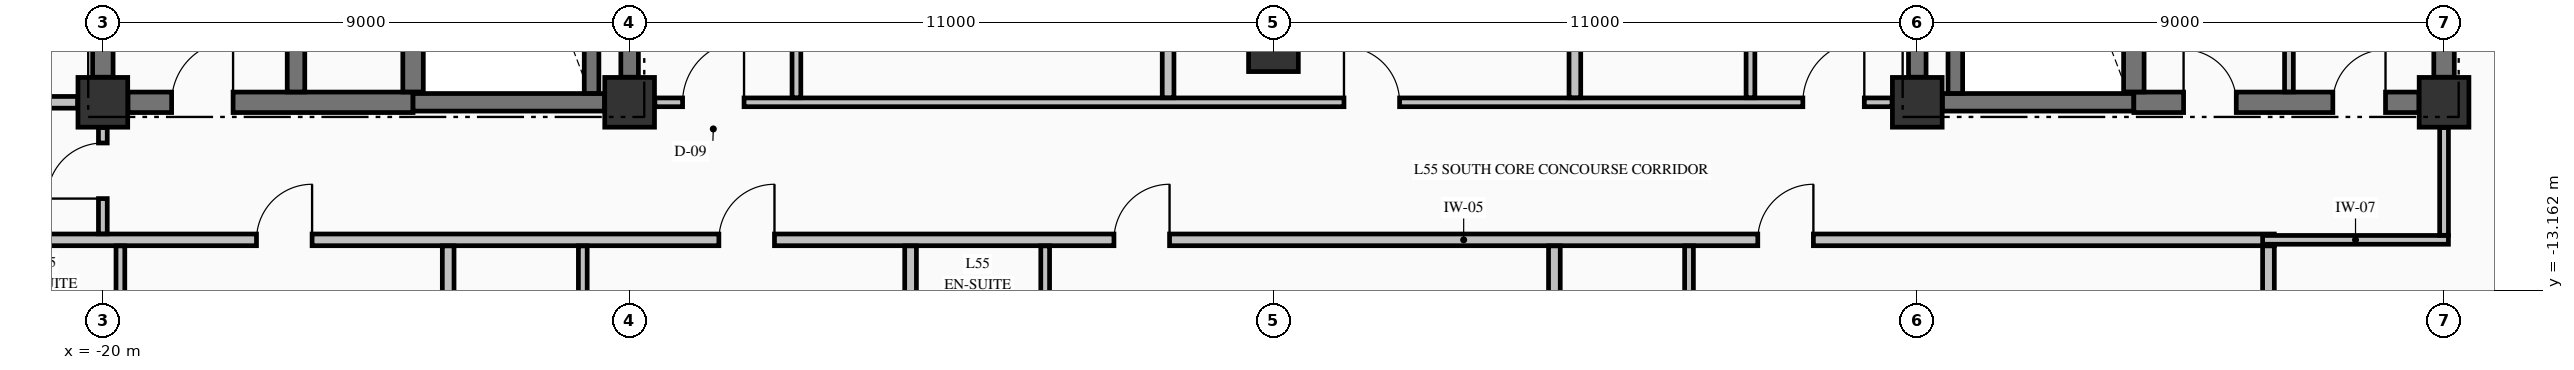
"""IFC4 building model, lengths in metres.
Left out: names, types, materials, properties, quantities, classifications, styles, units other than length and angle.
Written with IfcOpenShell. Run it as: python <this file> out.ifc"""

import sys

from ifc_helpers import new_model, si_unit, direction, frame, frame_2d, origin, origin_2d, place, context, subcontext, project, spatial, rectangle, extrude, element, fill, save


model = new_model("IFC4")
c1 = context("Model", 3, precision=1e-05, world=origin(), true_north=direction((0.0, 1.0)))
c2 = subcontext(c1, "Body", "Model", "MODEL_VIEW")
j1 = project(units=[si_unit("LENGTHUNIT", "METRE"), si_unit("PLANEANGLEUNIT", "RADIAN")], contexts=[c1])
p1 = place(None, origin())
s1 = spatial("IfcSite", under=j1, at=p1, CompositionType="ELEMENT")
p2 = place(p1, origin())
s2 = spatial("IfcBuilding", under=s1, at=p2, CompositionType="ELEMENT")
p3 = place(p2, frame((0.0, 0.0, 211.86)))
s3 = spatial("IfcBuildingStorey", under=s2, at=p3, CompositionType="ELEMENT", Elevation=211.86)
for number, where, z_axis, x_axis in (
    (1, (-20.0, -9.95, -0.325), (0.0, 0.0, 1.0), (1.0, 0.0, 0.0)),
    (2, (-11.0, -9.95, -0.325), (0.0, 0.0, 1.0), (1.0, 0.0, 0.0)),
    (3, (11.0, -9.95, -0.325), (0.0, 0.0, 1.0), (1.0, 0.0, 0.0)),
    (4, (20.0, -9.95, -0.325), (0.0, 0.0, 1.0), (1.0, 0.0, 0.0)),
    (5, (0.0, -9.0, -0.325), (0.0, 0.0, 1.0), (1.0, 0.0, 0.0)),
):
    element("IfcColumn", number, at=place(p3, frame(where, z_axis=z_axis, x_axis=x_axis)), inside=s3, PredefinedType="COLUMN", context=c2, shape_type="SweptSolid", body=[
        extrude(rectangle(XDim=0.85, YDim=0.85, at=origin_2d()), origin(), (0.0, 0.0, 1.0), 3.475),
    ])
p4 = place(p3, frame((-19.571, -9.95, 0.0), z_axis=(0.0, 0.0, 1.0), x_axis=(1.0, 0.0, 0.0)))
e6 = element("IfcWall", 6, at=p4, inside=s3, PredefinedType="SHEAR", context=c2, shape_type="SweptSolid", body=[
    extrude(rectangle(XDim=4.871, YDim=0.35, at=frame_2d((2.436, 0.0))), origin(), (0.0, 0.0, 1.0), 3.15),
])
p5 = place(p4, frame((0.746, 0.0, 0.0)))
e7 = element("IfcOpeningElement", 7, at=p5, cuts=e6, PredefinedType="OPENING", context=c2, shape_type="SweptSolid", body=[
    extrude(rectangle(XDim=1.05, YDim=2.15, at=frame_2d((0.525, 1.075))), frame((0.0, 0.185, 0.0), z_axis=(0.0, -1.0, 0.0), x_axis=(1.0, 0.0, 0.0)), (0.0, 0.0, 1.0), 0.37),
])
for number, where, z_axis, x_axis in (
    (8, (-14.7, -9.95, 0.0), (0.0, 0.0, 1.0), (1.0, 0.0, 0.0)),
    (9, (11.429, -9.95, 0.0), (0.0, 0.0, 1.0), (1.0, 0.0, 0.0)),
):
    element("IfcWall", number, at=place(p3, frame(where, z_axis=z_axis, x_axis=x_axis)), inside=s3, PredefinedType="SHEAR", context=c2, shape_type="SweptSolid", body=[
        extrude(rectangle(XDim=3.271, YDim=0.3, at=frame_2d((1.635, 0.0))), origin(), (0.0, 0.0, 1.0), 3.15),
    ])
p6 = place(p3, frame((14.7, -9.95, 0.0), z_axis=(0.0, 0.0, 1.0), x_axis=(1.0, 0.0, 0.0)))
e10 = element("IfcWall", 10, at=p6, inside=s3, PredefinedType="SHEAR", context=c2, shape_type="SweptSolid", body=[
    extrude(rectangle(XDim=4.871, YDim=0.35, at=frame_2d((2.436, 0.0))), origin(), (0.0, 0.0, 1.0), 3.15),
])
p7 = place(p6, frame((0.85, 0.0, 0.0)))
e11 = element("IfcOpeningElement", 11, at=p7, cuts=e10, PredefinedType="OPENING", context=c2, shape_type="SweptSolid", body=[
    extrude(rectangle(XDim=0.9, YDim=2.15, at=frame_2d((0.45, 1.075))), frame((0.0, 0.185, 0.0), z_axis=(0.0, -1.0, 0.0), x_axis=(1.0, 0.0, 0.0)), (0.0, 0.0, 1.0), 0.37),
])
p8 = place(p6, frame((3.4, 0.0, 0.0)))
e12 = element("IfcOpeningElement", 12, at=p8, cuts=e10, PredefinedType="OPENING", context=c2, shape_type="SweptSolid", body=[
    extrude(rectangle(XDim=0.9, YDim=2.15, at=frame_2d((0.45, 1.075))), frame((0.0, 0.185, 0.0), z_axis=(0.0, -1.0, 0.0), x_axis=(1.0, 0.0, 0.0)), (0.0, 0.0, 1.0), 0.37),
])
p9 = place(p3, frame((-22.1, -12.3, 0.0), z_axis=(0.0, 0.0, 1.0), x_axis=(1.0, 0.0, 0.0)))
e13 = element("IfcWall", 13, at=p9, inside=s3, PredefinedType="PARTITIONING", context=c2, shape_type="SweptSolid", body=[
    extrude(rectangle(XDim=39.2, YDim=0.2, at=frame_2d((19.6, 0.0))), origin(), (0.0, 0.0, 1.0), 3.15),
])
p10 = place(p9, frame((4.725, 0.0, 0.0)))
e14 = element("IfcOpeningElement", 14, at=p10, cuts=e13, PredefinedType="OPENING", context=c2, shape_type="SweptSolid", body=[
    extrude(rectangle(XDim=0.95, YDim=2.15, at=frame_2d((0.475, 1.075))), frame((0.0, 0.11, 0.0), z_axis=(0.0, -1.0, 0.0), x_axis=(1.0, 0.0, 0.0)), (0.0, 0.0, 1.0), 0.22),
])
p11 = place(p9, frame((12.625, 0.0, 0.0)))
e15 = element("IfcOpeningElement", 15, at=p11, cuts=e13, PredefinedType="OPENING", context=c2, shape_type="SweptSolid", body=[
    extrude(rectangle(XDim=0.95, YDim=2.15, at=frame_2d((0.475, 1.075))), frame((0.0, 0.11, 0.0), z_axis=(0.0, -1.0, 0.0), x_axis=(1.0, 0.0, 0.0)), (0.0, 0.0, 1.0), 0.22),
])
p12 = place(p9, frame((19.375, 0.0, 0.0)))
e16 = element("IfcOpeningElement", 16, at=p12, cuts=e13, PredefinedType="OPENING", context=c2, shape_type="SweptSolid", body=[
    extrude(rectangle(XDim=0.95, YDim=2.15, at=frame_2d((0.475, 1.075))), frame((0.0, 0.11, 0.0), z_axis=(0.0, -1.0, 0.0), x_axis=(1.0, 0.0, 0.0)), (0.0, 0.0, 1.0), 0.22),
])
p13 = place(p9, frame((30.375, 0.0, 0.0)))
e17 = element("IfcOpeningElement", 17, at=p13, cuts=e13, PredefinedType="OPENING", context=c2, shape_type="SweptSolid", body=[
    extrude(rectangle(XDim=0.95, YDim=2.15, at=frame_2d((0.475, 1.075))), frame((0.0, 0.11, 0.0), z_axis=(0.0, -1.0, 0.0), x_axis=(1.0, 0.0, 0.0)), (0.0, 0.0, 1.0), 0.22),
])
p14 = place(p3, frame((16.9, -12.3, 0.0), z_axis=(0.0, 0.0, 1.0), x_axis=(1.0, 0.0, 0.0)))
e18 = element("IfcWall", 18, at=p14, inside=s3, PredefinedType="PARTITIONING", context=c2, shape_type="SweptSolid", body=[
    extrude(rectangle(XDim=3.175, YDim=0.15, at=frame_2d((1.587, 0.0))), origin(), (0.0, 0.0, 1.0), 3.15),
])
p15 = place(p3, frame((-26.835, -9.95, 0.0), z_axis=(0.0, 0.0, 1.0), x_axis=(1.0, 0.0, 0.0)))
e19 = element("IfcWall", 19, at=p15, inside=s3, PredefinedType="PARTITIONING", context=c2, shape_type="SweptSolid", body=[
    extrude(rectangle(XDim=6.404, YDim=0.2, at=frame_2d((3.202, 0.0))), origin(), (0.0, 0.0, 1.0), 3.15),
])
p16 = place(p15, frame((2.86, 0.0, 0.0)))
e20 = element("IfcOpeningElement", 20, at=p16, cuts=e19, PredefinedType="OPENING", context=c2, shape_type="SweptSolid", body=[
    extrude(rectangle(XDim=0.95, YDim=2.15, at=frame_2d((0.475, 1.075))), frame((0.0, 0.11, 0.0), z_axis=(0.0, -1.0, 0.0), x_axis=(1.0, 0.0, 0.0)), (0.0, 0.0, 1.0), 0.22),
])
p17 = place(p3, frame((-10.569, -9.95, 0.0), z_axis=(0.0, 0.0, 1.0), x_axis=(1.0, 0.0, 0.0)))
e21 = element("IfcWall", 21, at=p17, inside=s3, PredefinedType="PARTITIONING", context=c2, shape_type="SweptSolid", body=[
    extrude(rectangle(XDim=21.138, YDim=0.15, at=frame_2d((10.569, 0.0))), origin(), (0.0, 0.0, 1.0), 3.15),
])
p18 = place(p17, frame((0.474, 0.0, 0.0)))
e22 = element("IfcOpeningElement", 22, at=p18, cuts=e21, PredefinedType="OPENING", context=c2, shape_type="SweptSolid", body=[
    extrude(rectangle(XDim=1.05, YDim=2.15, at=frame_2d((0.525, 1.075))), frame((0.0, 0.085, 0.0), z_axis=(0.0, -1.0, 0.0), x_axis=(1.0, 0.0, 0.0)), (0.0, 0.0, 1.0), 0.17),
])
p19 = place(p17, frame((19.614, 0.0, 0.0)))
e23 = element("IfcOpeningElement", 23, at=p19, cuts=e21, PredefinedType="OPENING", context=c2, shape_type="SweptSolid", body=[
    extrude(rectangle(XDim=1.05, YDim=2.15, at=frame_2d((0.525, 1.075))), frame((0.0, 0.085, 0.0), z_axis=(0.0, -1.0, 0.0), x_axis=(1.0, 0.0, 0.0)), (0.0, 0.0, 1.0), 0.17),
])
p20 = place(p17, frame((11.774, 0.0, 0.0)))
e24 = element("IfcOpeningElement", 24, at=p20, cuts=e21, PredefinedType="OPENING", context=c2, shape_type="SweptSolid", body=[
    extrude(rectangle(XDim=0.95, YDim=2.15, at=frame_2d((0.475, 1.075))), frame((0.0, 0.085, 0.0), z_axis=(0.0, -1.0, 0.0), x_axis=(1.0, 0.0, 0.0)), (0.0, 0.0, 1.0), 0.17),
])
p21 = place(p3, frame((-20.0, -9.521, 0.0), z_axis=(0.0, 0.0, 1.0), x_axis=(0.0, 1.0, 0.0)))
e25 = element("IfcWall", 25, at=p21, inside=s3, PredefinedType="SHEAR", context=c2, shape_type="SweptSolid", body=[
    extrude(rectangle(XDim=9.092, YDim=0.35, at=frame_2d((4.546, 0.0))), origin(), (0.0, 0.0, 1.0), 3.15),
])
p22 = place(p3, frame((-16.7, -9.773, 0.0), z_axis=(0.0, 0.0, 1.0), x_axis=(0.0, 1.0, 0.0)))
e26 = element("IfcWall", 26, at=p22, inside=s3, PredefinedType="SHEAR", context=c2, shape_type="SweptSolid", body=[
    extrude(rectangle(XDim=9.371, YDim=0.3, at=frame_2d((4.686, 0.0))), origin(), (0.0, 0.0, 1.0), 3.15),
])
p23 = place(p3, frame((-14.7, -9.773, 0.0), z_axis=(0.0, 0.0, 1.0), x_axis=(0.0, 1.0, 0.0)))
e27 = element("IfcWall", 27, at=p23, inside=s3, PredefinedType="SHEAR", context=c2, shape_type="SweptSolid", body=[
    extrude(rectangle(XDim=9.371, YDim=0.35, at=frame_2d((4.686, 0.0))), origin(), (0.0, 0.0, 1.0), 3.15),
])
p24 = place(p3, frame((-11.65, -9.798, 0.0), z_axis=(0.0, 0.0, 1.0), x_axis=(0.0, 1.0, 0.0)))
e28 = element("IfcWall", 28, at=p24, inside=s3, PredefinedType="SOLIDWALL", context=c2, shape_type="SweptSolid", body=[
    extrude(rectangle(XDim=9.396, YDim=0.25, at=frame_2d((4.698, 0.0))), origin(), (0.0, 0.0, 1.0), 3.15),
])
for number, where, z_axis, x_axis in (
    (29, (-11.0, -9.521, 0.0), (0.0, 0.0, 1.0), (0.0, 1.0, 0.0)),
    (30, (11.0, -9.521, 0.0), (0.0, 0.0, 1.0), (0.0, 1.0, 0.0)),
):
    element("IfcWall", number, at=place(p3, frame(where, z_axis=z_axis, x_axis=x_axis)), inside=s3, PredefinedType="SHEAR", context=c2, shape_type="SweptSolid", body=[
        extrude(rectangle(XDim=9.092, YDim=0.3, at=frame_2d((4.546, 0.0))), origin(), (0.0, 0.0, 1.0), 3.15),
    ])
p25 = place(p3, frame((11.65, -9.798, 0.0), z_axis=(0.0, 0.0, 1.0), x_axis=(0.0, 1.0, 0.0)))
e31 = element("IfcWall", 31, at=p25, inside=s3, PredefinedType="SOLIDWALL", context=c2, shape_type="SweptSolid", body=[
    extrude(rectangle(XDim=9.396, YDim=0.25, at=frame_2d((4.698, 0.0))), origin(), (0.0, 0.0, 1.0), 3.15),
])
p26 = place(p3, frame((14.7, -9.773, 0.0), z_axis=(0.0, 0.0, 1.0), x_axis=(0.0, 1.0, 0.0)))
e32 = element("IfcWall", 32, at=p26, inside=s3, PredefinedType="SHEAR", context=c2, shape_type="SweptSolid", body=[
    extrude(rectangle(XDim=9.371, YDim=0.35, at=frame_2d((4.686, 0.0))), origin(), (0.0, 0.0, 1.0), 3.15),
])
p27 = place(p3, frame((20.0, -9.521, 0.0), z_axis=(0.0, 0.0, 1.0), x_axis=(0.0, 1.0, 0.0)))
e33 = element("IfcWall", 33, at=p27, inside=s3, PredefinedType="SHEAR", context=c2, shape_type="SweptSolid", body=[
    extrude(rectangle(XDim=9.092, YDim=0.35, at=frame_2d((4.546, 0.0))), origin(), (0.0, 0.0, 1.0), 3.15),
])
p28 = place(p3, frame((-20.0, -12.197, 0.0), z_axis=(0.0, 0.0, 1.0), x_axis=(0.0, 1.0, 0.0)))
e34 = element("IfcWall", 34, at=p28, inside=s3, PredefinedType="PARTITIONING", context=c2, shape_type="SweptSolid", body=[
    extrude(rectangle(XDim=1.816, YDim=0.15, at=frame_2d((0.908, 0.0))), origin(), (0.0, 0.0, 1.0), 2.342),
])
p29 = place(p28, frame((0.602, 0.0, 0.0)))
e35 = element("IfcOpeningElement", 35, at=p29, cuts=e34, PredefinedType="OPENING", context=c2, shape_type="SweptSolid", body=[
    extrude(rectangle(XDim=0.95, YDim=2.15, at=frame_2d((0.475, 1.075))), frame((0.0, 0.085, 0.0), z_axis=(0.0, -1.0, 0.0), x_axis=(1.0, 0.0, 0.0)), (0.0, 0.0, 1.0), 0.17),
])
p30 = place(p3, frame((-19.7, -15.172, 0.0), z_axis=(0.0, 0.0, 1.0), x_axis=(0.0, 1.0, 0.0)))
e36 = element("IfcWall", 36, at=p30, inside=s3, PredefinedType="PARTITIONING", context=c2, shape_type="SweptSolid", body=[
    extrude(rectangle(XDim=2.769, YDim=0.15, at=frame_2d((1.385, 0.0))), origin(), (0.0, 0.0, 1.0), 2.342),
])
p31 = place(p3, frame((-14.1, -14.472, 0.0), z_axis=(0.0, 0.0, 1.0), x_axis=(0.0, 1.0, 0.0)))
e37 = element("IfcWall", 37, at=p31, inside=s3, PredefinedType="PARTITIONING", context=c2, shape_type="SweptSolid", body=[
    extrude(rectangle(XDim=2.069, YDim=0.2, at=frame_2d((1.034, 0.0))), origin(), (0.0, 0.0, 1.0), 3.15),
])
p32 = place(p3, frame((-11.8, -14.472, 0.0), z_axis=(0.0, 0.0, 1.0), x_axis=(0.0, 1.0, 0.0)))
e38 = element("IfcWall", 38, at=p32, inside=s3, PredefinedType="PARTITIONING", context=c2, shape_type="SweptSolid", body=[
    extrude(rectangle(XDim=2.069, YDim=0.15, at=frame_2d((1.034, 0.0))), origin(), (0.0, 0.0, 1.0), 3.15),
])
p33 = place(p3, frame((-8.15, -9.872, 0.0), z_axis=(0.0, 0.0, 1.0), x_axis=(0.0, 1.0, 0.0)))
e39 = element("IfcWall", 39, at=p33, inside=s3, PredefinedType="PARTITIONING", context=c2, shape_type="SweptSolid", body=[
    extrude(rectangle(XDim=7.169, YDim=0.15, at=frame_2d((3.584, 0.0))), origin(), (0.0, 0.0, 1.0), 3.15),
])
p34 = place(p33, frame((3.102, 0.0, 0.0)))
e40 = element("IfcOpeningElement", 40, at=p34, cuts=e39, PredefinedType="OPENING", context=c2, shape_type="SweptSolid", body=[
    extrude(rectangle(XDim=1.0, YDim=2.15, at=frame_2d((0.5, 1.075))), frame((0.0, 0.085, 0.0), z_axis=(0.0, -1.0, 0.0), x_axis=(1.0, 0.0, 0.0)), (0.0, 0.0, 1.0), 0.17),
])
p35 = place(p3, frame((-6.2, -15.172, 0.0), z_axis=(0.0, 0.0, 1.0), x_axis=(0.0, 1.0, 0.0)))
e41 = element("IfcWall", 41, at=p35, inside=s3, PredefinedType="PARTITIONING", context=c2, shape_type="SweptSolid", body=[
    extrude(rectangle(XDim=2.769, YDim=0.2, at=frame_2d((1.385, 0.0))), origin(), (0.0, 0.0, 1.0), 3.15),
])
p36 = place(p3, frame((-3.9, -15.172, 0.0), z_axis=(0.0, 0.0, 1.0), x_axis=(0.0, 1.0, 0.0)))
e42 = element("IfcWall", 42, at=p36, inside=s3, PredefinedType="PARTITIONING", context=c2, shape_type="SweptSolid", body=[
    extrude(rectangle(XDim=2.769, YDim=0.15, at=frame_2d((1.385, 0.0))), origin(), (0.0, 0.0, 1.0), 3.15),
])
p37 = place(p3, frame((-1.8, -9.872, 0.0), z_axis=(0.0, 0.0, 1.0), x_axis=(0.0, 1.0, 0.0)))
e43 = element("IfcWall", 43, at=p37, inside=s3, PredefinedType="PARTITIONING", context=c2, shape_type="SweptSolid", body=[
    extrude(rectangle(XDim=4.569, YDim=0.2, at=frame_2d((2.285, 0.0))), origin(), (0.0, 0.0, 1.0), 3.15),
])
p38 = place(p3, frame((4.8, -14.472, 0.0), z_axis=(0.0, 0.0, 1.0), x_axis=(0.0, 1.0, 0.0)))
e44 = element("IfcWall", 44, at=p38, inside=s3, PredefinedType="PARTITIONING", context=c2, shape_type="SweptSolid", body=[
    extrude(rectangle(XDim=2.069, YDim=0.2, at=frame_2d((1.034, 0.0))), origin(), (0.0, 0.0, 1.0), 3.15),
])
p39 = place(p3, frame((5.15, -9.872, 0.0), z_axis=(0.0, 0.0, 1.0), x_axis=(0.0, 1.0, 0.0)))
e45 = element("IfcWall", 45, at=p39, inside=s3, PredefinedType="PARTITIONING", context=c2, shape_type="SweptSolid", body=[
    extrude(rectangle(XDim=4.569, YDim=0.2, at=frame_2d((2.285, 0.0))), origin(), (0.0, 0.0, 1.0), 3.15),
])
p40 = place(p3, frame((7.1, -14.472, 0.0), z_axis=(0.0, 0.0, 1.0), x_axis=(0.0, 1.0, 0.0)))
e46 = element("IfcWall", 46, at=p40, inside=s3, PredefinedType="PARTITIONING", context=c2, shape_type="SweptSolid", body=[
    extrude(rectangle(XDim=2.069, YDim=0.15, at=frame_2d((1.034, 0.0))), origin(), (0.0, 0.0, 1.0), 3.15),
])
p41 = place(p3, frame((8.15, -9.872, 0.0), z_axis=(0.0, 0.0, 1.0), x_axis=(0.0, 1.0, 0.0)))
e47 = element("IfcWall", 47, at=p41, inside=s3, PredefinedType="PARTITIONING", context=c2, shape_type="SweptSolid", body=[
    extrude(rectangle(XDim=4.569, YDim=0.15, at=frame_2d((2.285, 0.0))), origin(), (0.0, 0.0, 1.0), 3.15),
])
p42 = place(p41, frame((1.847, 0.0, 0.0)))
e48 = element("IfcOpeningElement", 48, at=p42, cuts=e47, PredefinedType="OPENING", context=c2, shape_type="SweptSolid", body=[
    extrude(rectangle(XDim=0.95, YDim=2.15, at=frame_2d((0.475, 1.075))), frame((0.0, 0.085, 0.0), z_axis=(0.0, -1.0, 0.0), x_axis=(1.0, 0.0, 0.0)), (0.0, 0.0, 1.0), 0.17),
])
p43 = place(p3, frame((17.0, -18.994, 0.0), z_axis=(0.0, 0.0, 1.0), x_axis=(0.0, 1.0, 0.0)))
e49 = element("IfcWall", 49, at=p43, inside=s3, PredefinedType="PARTITIONING", context=c2, shape_type="SweptSolid", body=[
    extrude(rectangle(XDim=6.591, YDim=0.2, at=frame_2d((3.295, 0.0))), origin(), (0.0, 0.0, 1.0), 3.15),
])
p44 = place(p3, frame((17.35, -9.772, 0.0), z_axis=(0.0, 0.0, 1.0), x_axis=(0.0, 1.0, 0.0)))
e50 = element("IfcWall", 50, at=p44, inside=s3, PredefinedType="PARTITIONING", context=c2, shape_type="SweptSolid", body=[
    extrude(rectangle(XDim=14.494, YDim=0.15, at=frame_2d((7.247, 0.0))), origin(), (0.0, 0.0, 1.0), 3.15),
])
p45 = place(p3, frame((20.0, -12.222, 0.0), z_axis=(0.0, 0.0, 1.0), x_axis=(0.0, 1.0, 0.0)))
e51 = element("IfcWall", 51, at=p45, inside=s3, PredefinedType="PARTITIONING", context=c2, shape_type="SweptSolid", body=[
    extrude(rectangle(XDim=1.841, YDim=0.15, at=frame_2d((0.92, 0.0))), origin(), (0.0, 0.0, 1.0), 2.342),
])
p46 = place(p5, origin())
e52 = element("IfcDoor", 52, at=p46, inside=s3, OperationType="SINGLE_SWING_RIGHT", PredefinedType="DOOR", context=c2, shape_type="SweptSolid", body=[
    extrude(rectangle(XDim=1.05, YDim=2.15, at=frame_2d((0.525, 1.075))), frame((0.0, 0.025, 0.0), z_axis=(0.0, -1.0, 0.0), x_axis=(1.0, 0.0, 0.0)), (0.0, 0.0, 1.0), 0.05),
])
fill(e7, e52)
p47 = place(p7, origin())
e53 = element("IfcDoor", 53, at=p47, inside=s3, OperationType="SINGLE_SWING_LEFT", PredefinedType="DOOR", context=c2, shape_type="SweptSolid", body=[
    extrude(rectangle(XDim=0.9, YDim=2.15, at=frame_2d((0.45, 1.075))), frame((0.0, 0.025, 0.0), z_axis=(0.0, -1.0, 0.0), x_axis=(1.0, 0.0, 0.0)), (0.0, 0.0, 1.0), 0.05),
])
fill(e11, e53)
p48 = place(p8, origin())
e54 = element("IfcDoor", 54, at=p48, inside=s3, OperationType="SINGLE_SWING_RIGHT", PredefinedType="DOOR", context=c2, shape_type="SweptSolid", body=[
    extrude(rectangle(XDim=0.9, YDim=2.15, at=frame_2d((0.45, 1.075))), frame((0.0, 0.025, 0.0), z_axis=(0.0, -1.0, 0.0), x_axis=(1.0, 0.0, 0.0)), (0.0, 0.0, 1.0), 0.05),
])
fill(e12, e54)
p49 = place(p18, origin())
e55 = element("IfcDoor", 55, at=p49, inside=s3, OperationType="SINGLE_SWING_RIGHT", PredefinedType="DOOR", context=c2, shape_type="SweptSolid", body=[
    extrude(rectangle(XDim=1.05, YDim=2.15, at=frame_2d((0.525, 1.075))), frame((0.0, 0.025, 0.0), z_axis=(0.0, -1.0, 0.0), x_axis=(1.0, 0.0, 0.0)), (0.0, 0.0, 1.0), 0.05),
])
fill(e22, e55)
p50 = place(p19, origin())
e56 = element("IfcDoor", 56, at=p50, inside=s3, OperationType="SINGLE_SWING_RIGHT", PredefinedType="DOOR", context=c2, shape_type="SweptSolid", body=[
    extrude(rectangle(XDim=1.05, YDim=2.15, at=frame_2d((0.525, 1.075))), frame((0.0, 0.025, 0.0), z_axis=(0.0, -1.0, 0.0), x_axis=(1.0, 0.0, 0.0)), (0.0, 0.0, 1.0), 0.05),
])
fill(e23, e56)
p51 = place(p10, origin())
e57 = element("IfcDoor", 57, at=p51, inside=s3, OperationType="SINGLE_SWING_RIGHT", PredefinedType="DOOR", context=c2, shape_type="SweptSolid", body=[
    extrude(rectangle(XDim=0.95, YDim=2.15, at=frame_2d((0.475, 1.075))), frame((0.0, 0.025, 0.0), z_axis=(0.0, -1.0, 0.0), x_axis=(1.0, 0.0, 0.0)), (0.0, 0.0, 1.0), 0.05),
])
fill(e14, e57)
p52 = place(p11, origin())
e58 = element("IfcDoor", 58, at=p52, inside=s3, OperationType="SINGLE_SWING_RIGHT", PredefinedType="DOOR", context=c2, shape_type="SweptSolid", body=[
    extrude(rectangle(XDim=0.95, YDim=2.15, at=frame_2d((0.475, 1.075))), frame((0.0, 0.025, 0.0), z_axis=(0.0, -1.0, 0.0), x_axis=(1.0, 0.0, 0.0)), (0.0, 0.0, 1.0), 0.05),
])
fill(e15, e58)
p53 = place(p12, origin())
e59 = element("IfcDoor", 59, at=p53, inside=s3, OperationType="SINGLE_SWING_RIGHT", PredefinedType="DOOR", context=c2, shape_type="SweptSolid", body=[
    extrude(rectangle(XDim=0.95, YDim=2.15, at=frame_2d((0.475, 1.075))), frame((0.0, 0.025, 0.0), z_axis=(0.0, -1.0, 0.0), x_axis=(1.0, 0.0, 0.0)), (0.0, 0.0, 1.0), 0.05),
])
fill(e16, e59)
p54 = place(p13, origin())
e60 = element("IfcDoor", 60, at=p54, inside=s3, OperationType="SINGLE_SWING_RIGHT", PredefinedType="DOOR", context=c2, shape_type="SweptSolid", body=[
    extrude(rectangle(XDim=0.95, YDim=2.15, at=frame_2d((0.475, 1.075))), frame((0.0, 0.025, 0.0), z_axis=(0.0, -1.0, 0.0), x_axis=(1.0, 0.0, 0.0)), (0.0, 0.0, 1.0), 0.05),
])
fill(e17, e60)
p55 = place(p20, origin())
e61 = element("IfcDoor", 61, at=p55, inside=s3, OperationType="SINGLE_SWING_LEFT", PredefinedType="DOOR", context=c2, shape_type="SweptSolid", body=[
    extrude(rectangle(XDim=0.95, YDim=2.15, at=frame_2d((0.475, 1.075))), frame((0.0, 0.025, 0.0), z_axis=(0.0, -1.0, 0.0), x_axis=(1.0, 0.0, 0.0)), (0.0, 0.0, 1.0), 0.05),
])
fill(e24, e61)
p56 = place(p29, origin())
e62 = element("IfcDoor", 62, at=p56, inside=s3, OperationType="SINGLE_SWING_LEFT", PredefinedType="DOOR", context=c2, shape_type="SweptSolid", body=[
    extrude(rectangle(XDim=0.95, YDim=2.15, at=frame_2d((0.475, 1.075))), frame((0.0, 0.025, 0.0), z_axis=(0.0, -1.0, 0.0), x_axis=(1.0, 0.0, 0.0)), (0.0, 0.0, 1.0), 0.05),
])
fill(e35, e62)
save(model, sys.argv[1])
